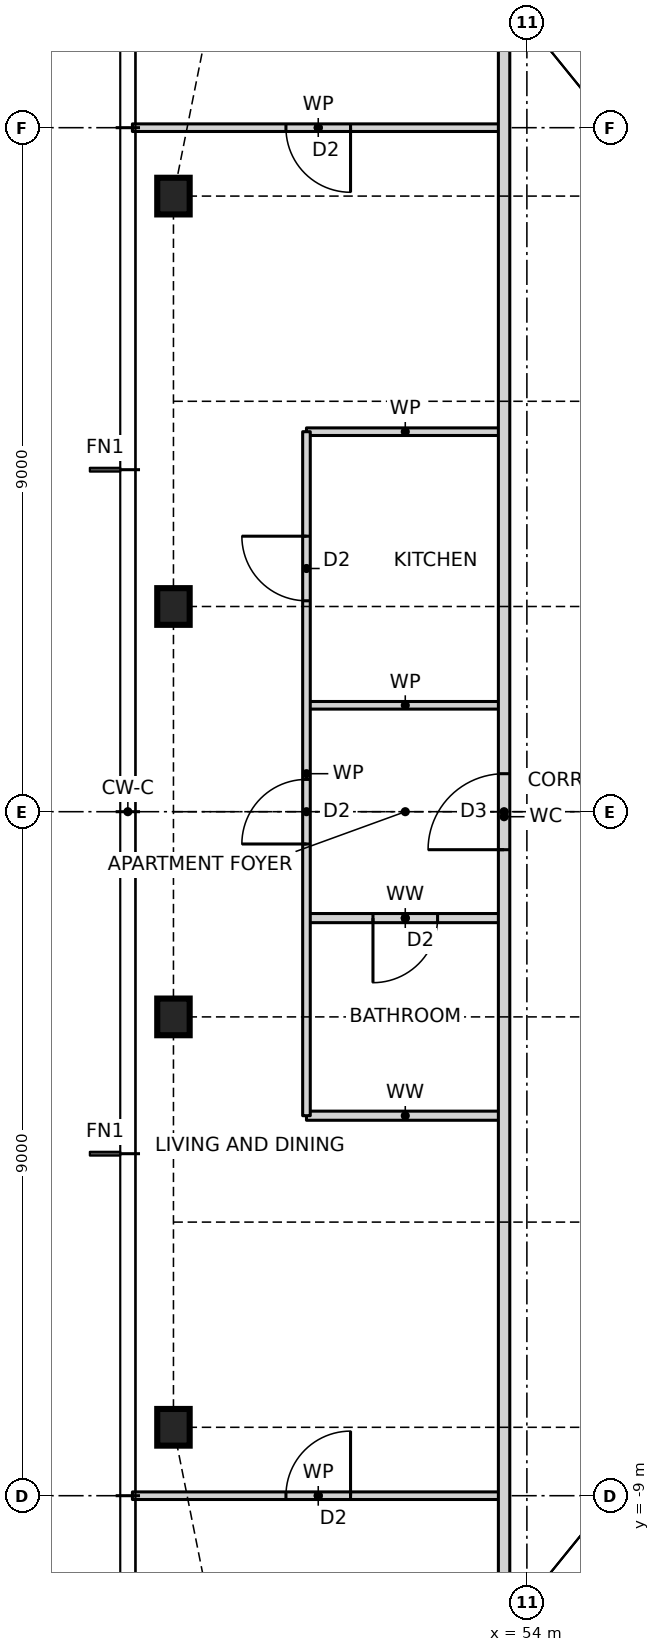
"""IFC4 building model, lengths in metres.
Left out: names, types, materials, properties, quantities, classifications, styles, units other than length and angle.
Written with IfcOpenShell. Run it as: python <this file> out.ifc"""

import sys

from ifc_helpers import new_model, si_unit, direction, frame, frame_2d, origin, origin_2d, place, context, subcontext, project, spatial, rectangle, i_section, extrude, element, fill, save


model = new_model("IFC4")
c1 = context("Model", 3, precision=1e-05, world=origin(), true_north=direction((0.0, 1.0)))
c2 = subcontext(c1, "Body", "Model", "MODEL_VIEW")
j1 = project(units=[si_unit("LENGTHUNIT", "METRE"), si_unit("PLANEANGLEUNIT", "RADIAN")], contexts=[c1])
p1 = place(None, origin())
s1 = spatial("IfcSite", under=j1, at=p1, CompositionType="ELEMENT")
p2 = place(p1, origin())
s2 = spatial("IfcBuilding", under=s1, at=p2, CompositionType="ELEMENT")
p3 = place(p2, frame((0.0, 0.0, 119.0)))
s3 = spatial("IfcBuildingStorey", under=s2, at=p3, CompositionType="ELEMENT", Elevation=119.0)
for number, where, z_axis, x_axis in (
    (1, (49.35, 8.1, 0.0), (0.0, 0.0, 1.0), (1.0, 0.0, 0.0)),
    (2, (49.35, 2.7, 0.0), (0.0, 0.0, 1.0), (1.0, 0.0, 0.0)),
    (3, (49.35, -2.7, 0.0), (0.0, 0.0, 1.0), (1.0, 0.0, 0.0)),
    (4, (49.35, -8.1, 0.0), (0.0, 0.0, 1.0), (1.0, 0.0, 0.0)),
):
    element("IfcColumn", number, at=place(p3, frame(where, z_axis=z_axis, x_axis=x_axis)), inside=s3, PredefinedType="COLUMN", context=c2, shape_type="SweptSolid", body=[
        extrude(i_section(OverallWidth=0.427, OverallDepth=0.483, WebThickness=0.051, FlangeThickness=0.082, at=origin_2d()), origin(), (0.0, 0.0, 1.0), 3.5),
    ])
p4 = place(p3, frame((48.81, -9.0, 0.0), z_axis=(0.0, 0.0, 1.0), x_axis=(1.0, 0.0, 0.0)))
e5 = element("IfcWall", 5, at=p4, inside=s3, PredefinedType="PARTITIONING", context=c2, shape_type="SweptSolid", body=[
    extrude(rectangle(XDim=4.89, YDim=0.1, at=frame_2d((2.445, 0.0))), origin(), (0.0, 0.0, 1.0), 3.27),
])
p5 = place(p4, frame((2.02, 0.0, 0.0)))
e6 = element("IfcOpeningElement", 6, at=p5, cuts=e5, PredefinedType="OPENING", context=c2, shape_type="SweptSolid", body=[
    extrude(rectangle(XDim=0.85, YDim=2.1, at=frame_2d((0.425, 1.05))), frame((0.0, 0.06, 0.0), z_axis=(0.0, -1.0, 0.0), x_axis=(1.0, 0.0, 0.0)), (0.0, 0.0, 1.0), 0.12),
])
p6 = place(p3, frame((51.1, -4.0, 0.0), z_axis=(0.0, 0.0, 1.0), x_axis=(1.0, 0.0, 0.0)))
e7 = element("IfcWall", 7, at=p6, inside=s3, PredefinedType="PARTITIONING", context=c2, shape_type="SweptSolid", body=[
    extrude(rectangle(XDim=2.6, YDim=0.12, at=frame_2d((1.3, 0.0))), origin(), (0.0, 0.0, 1.0), 3.27),
])
p7 = place(p3, frame((51.1, -1.4, 0.0), z_axis=(0.0, 0.0, 1.0), x_axis=(1.0, 0.0, 0.0)))
e8 = element("IfcWall", 8, at=p7, inside=s3, PredefinedType="PARTITIONING", context=c2, shape_type="SweptSolid", body=[
    extrude(rectangle(XDim=2.6, YDim=0.12, at=frame_2d((1.3, 0.0))), origin(), (0.0, 0.0, 1.0), 3.27),
])
p8 = place(p7, frame((0.875, 0.0, 0.0)))
e9 = element("IfcOpeningElement", 9, at=p8, cuts=e8, PredefinedType="OPENING", context=c2, shape_type="SweptSolid", body=[
    extrude(rectangle(XDim=0.85, YDim=2.1, at=frame_2d((0.425, 1.05))), frame((0.0, 0.07, 0.0), z_axis=(0.0, -1.0, 0.0), x_axis=(1.0, 0.0, 0.0)), (0.0, 0.0, 1.0), 0.14),
])
for number, where, z_axis, x_axis in (
    (10, (51.1, 1.4, 0.0), (0.0, 0.0, 1.0), (1.0, 0.0, 0.0)),
    (11, (51.1, 5.0, 0.0), (0.0, 0.0, 1.0), (1.0, 0.0, 0.0)),
):
    element("IfcWall", number, at=place(p3, frame(where, z_axis=z_axis, x_axis=x_axis)), inside=s3, PredefinedType="PARTITIONING", context=c2, shape_type="SweptSolid", body=[
        extrude(rectangle(XDim=2.6, YDim=0.1, at=frame_2d((1.3, 0.0))), origin(), (0.0, 0.0, 1.0), 3.27),
    ])
p9 = place(p3, frame((48.81, 9.0, 0.0), z_axis=(0.0, 0.0, 1.0), x_axis=(1.0, 0.0, 0.0)))
e12 = element("IfcWall", 12, at=p9, inside=s3, PredefinedType="PARTITIONING", context=c2, shape_type="SweptSolid", body=[
    extrude(rectangle(XDim=4.89, YDim=0.1, at=frame_2d((2.445, 0.0))), origin(), (0.0, 0.0, 1.0), 3.27),
])
p10 = place(p9, frame((2.02, 0.0, 0.0)))
e13 = element("IfcOpeningElement", 13, at=p10, cuts=e12, PredefinedType="OPENING", context=c2, shape_type="SweptSolid", body=[
    extrude(rectangle(XDim=0.85, YDim=2.1, at=frame_2d((0.425, 1.05))), frame((0.0, 0.06, 0.0), z_axis=(0.0, -1.0, 0.0), x_axis=(1.0, 0.0, 0.0)), (0.0, 0.0, 1.0), 0.12),
])
p11 = place(p3, frame((53.7, -10.9, 0.0), z_axis=(0.0, 0.0, 1.0), x_axis=(0.0, 1.0, 0.0)))
e14 = element("IfcWall", 14, at=p11, inside=s3, PredefinedType="PARTITIONING", context=c2, shape_type="SweptSolid", body=[
    extrude(rectangle(XDim=21.668, YDim=0.15, at=frame_2d((10.834, 0.0))), origin(), (0.0, 0.0, 1.0), 3.27),
])
p12 = place(p11, frame((10.4, 0.0, 0.0)))
e15 = element("IfcOpeningElement", 15, at=p12, cuts=e14, PredefinedType="OPENING", context=c2, shape_type="SweptSolid", body=[
    extrude(rectangle(XDim=1.0, YDim=2.1, at=frame_2d((0.5, 1.05))), frame((0.0, 0.085, 0.0), z_axis=(0.0, -1.0, 0.0), x_axis=(1.0, 0.0, 0.0)), (0.0, 0.0, 1.0), 0.17),
])
p13 = place(p3, frame((51.1, -4.0, 0.0), z_axis=(0.0, 0.0, 1.0), x_axis=(0.0, 1.0, 0.0)))
e16 = element("IfcWall", 16, at=p13, inside=s3, PredefinedType="PARTITIONING", context=c2, shape_type="SweptSolid", body=[
    extrude(rectangle(XDim=9.0, YDim=0.1, at=frame_2d((4.5, 0.0))), origin(), (0.0, 0.0, 1.0), 3.27),
])
p14 = place(p13, frame((6.775, 0.0, 0.0)))
e17 = element("IfcOpeningElement", 17, at=p14, cuts=e16, PredefinedType="OPENING", context=c2, shape_type="SweptSolid", body=[
    extrude(rectangle(XDim=0.85, YDim=2.1, at=frame_2d((0.425, 1.05))), frame((0.0, 0.06, 0.0), z_axis=(0.0, -1.0, 0.0), x_axis=(1.0, 0.0, 0.0)), (0.0, 0.0, 1.0), 0.12),
])
p15 = place(p13, frame((3.575, 0.0, 0.0)))
e18 = element("IfcOpeningElement", 18, at=p15, cuts=e16, PredefinedType="OPENING", context=c2, shape_type="SweptSolid", body=[
    extrude(rectangle(XDim=0.85, YDim=2.1, at=frame_2d((0.425, 1.05))), frame((0.0, 0.06, 0.0), z_axis=(0.0, -1.0, 0.0), x_axis=(1.0, 0.0, 0.0)), (0.0, 0.0, 1.0), 0.12),
])
p16 = place(p14, origin())
e19 = element("IfcDoor", 19, at=p16, inside=s3, OperationType="SINGLE_SWING_RIGHT", PredefinedType="DOOR", context=c2, shape_type="SweptSolid", body=[
    extrude(rectangle(XDim=0.85, YDim=2.1, at=frame_2d((0.425, 1.05))), frame((0.0, 0.025, 0.0), z_axis=(0.0, -1.0, 0.0), x_axis=(1.0, 0.0, 0.0)), (0.0, 0.0, 1.0), 0.05),
])
fill(e17, e19)
p17 = place(p12, origin())
e20 = element("IfcDoor", 20, at=p17, inside=s3, OperationType="SINGLE_SWING_LEFT", PredefinedType="DOOR", context=c2, shape_type="SweptSolid", body=[
    extrude(rectangle(XDim=1.0, YDim=2.1, at=frame_2d((0.5, 1.05))), frame((0.0, 0.025, 0.0), z_axis=(0.0, -1.0, 0.0), x_axis=(1.0, 0.0, 0.0)), (0.0, 0.0, 1.0), 0.05),
])
fill(e15, e20)
p18 = place(p15, origin())
e21 = element("IfcDoor", 21, at=p18, inside=s3, OperationType="SINGLE_SWING_LEFT", PredefinedType="DOOR", context=c2, shape_type="SweptSolid", body=[
    extrude(rectangle(XDim=0.85, YDim=2.1, at=frame_2d((0.425, 1.05))), frame((0.0, 0.025, 0.0), z_axis=(0.0, -1.0, 0.0), x_axis=(1.0, 0.0, 0.0)), (0.0, 0.0, 1.0), 0.05),
])
fill(e18, e21)
p19 = place(p8, frame((0.85, 0.0, 0.0), z_axis=(0.0, 0.0, 1.0), x_axis=(-1.0, 0.0, 0.0)))
e22 = element("IfcDoor", 22, at=p19, inside=s3, OperationType="SINGLE_SWING_RIGHT", PredefinedType="DOOR", context=c2, shape_type="SweptSolid", body=[
    extrude(rectangle(XDim=0.85, YDim=2.1, at=frame_2d((0.425, 1.05))), frame((0.0, 0.025, 0.0), z_axis=(0.0, -1.0, 0.0), x_axis=(1.0, 0.0, 0.0)), (0.0, 0.0, 1.0), 0.05),
])
fill(e9, e22)
p20 = place(p10, frame((0.85, 0.0, 0.0), z_axis=(0.0, 0.0, 1.0), x_axis=(-1.0, 0.0, 0.0)))
e23 = element("IfcDoor", 23, at=p20, inside=s3, OperationType="SINGLE_SWING_LEFT", PredefinedType="DOOR", context=c2, shape_type="SweptSolid", body=[
    extrude(rectangle(XDim=0.85, YDim=2.1, at=frame_2d((0.425, 1.05))), frame((0.0, 0.025, 0.0), z_axis=(0.0, -1.0, 0.0), x_axis=(1.0, 0.0, 0.0)), (0.0, 0.0, 1.0), 0.05),
])
fill(e13, e23)
p21 = place(p5, origin())
e24 = element("IfcDoor", 24, at=p21, inside=s3, OperationType="SINGLE_SWING_RIGHT", PredefinedType="DOOR", context=c2, shape_type="SweptSolid", body=[
    extrude(rectangle(XDim=0.85, YDim=2.1, at=frame_2d((0.425, 1.05))), frame((0.0, 0.025, 0.0), z_axis=(0.0, -1.0, 0.0), x_axis=(1.0, 0.0, 0.0)), (0.0, 0.0, 1.0), 0.05),
])
fill(e6, e24)
save(model, sys.argv[1])
